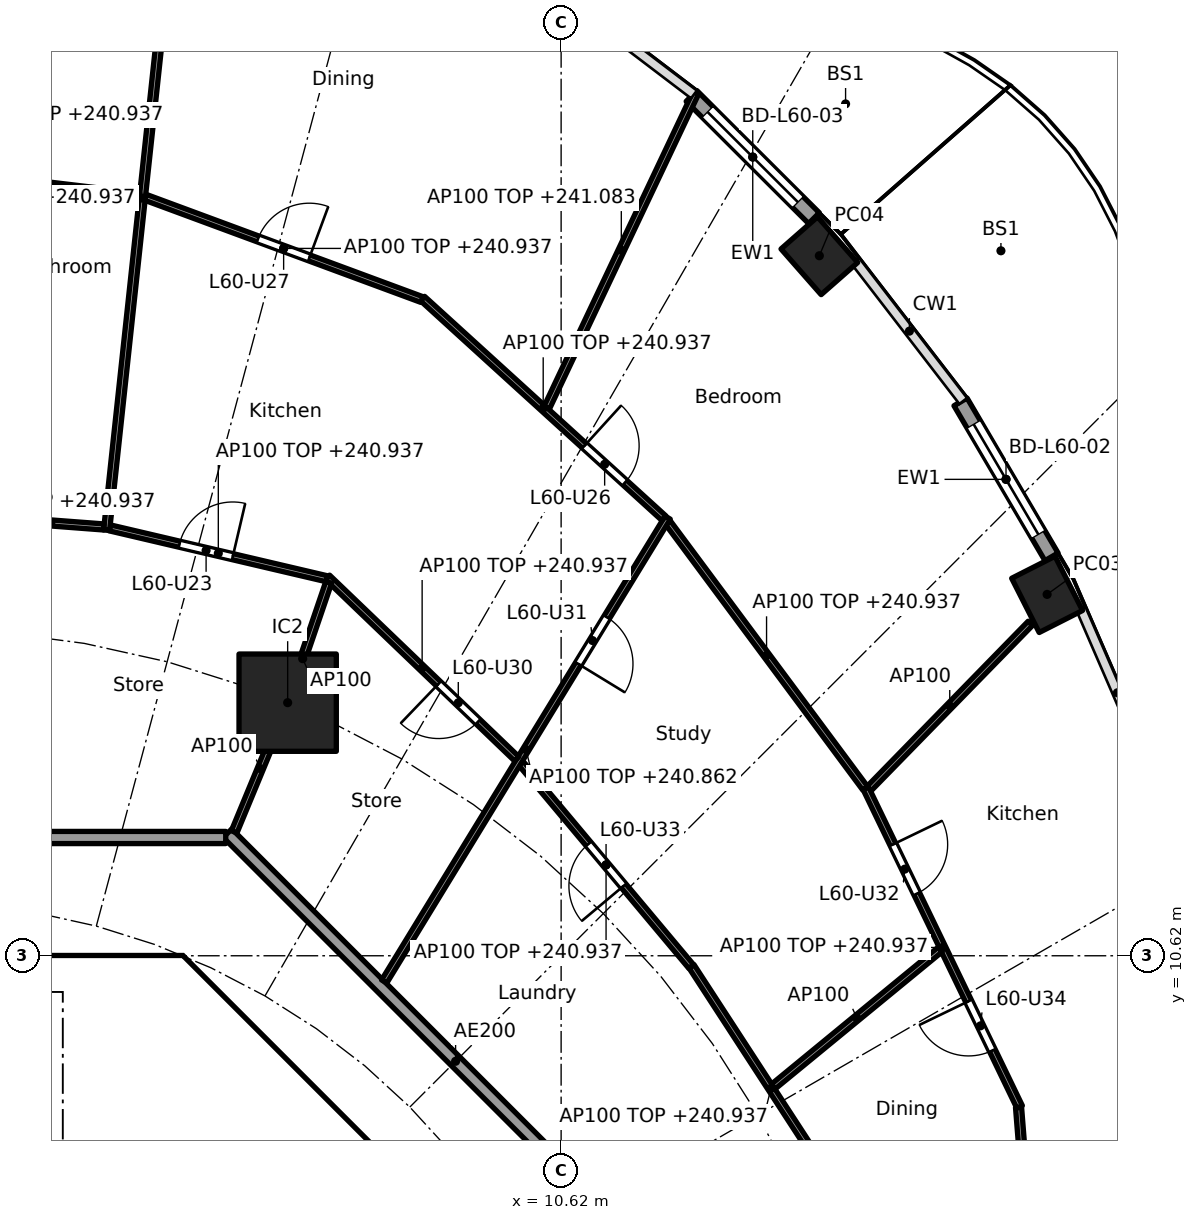
"""IFC4 building model, lengths in metres.
Left out: names, types, materials, properties, quantities, classifications, styles, units other than length and angle.
Written with IfcOpenShell. Run it as: python <this file> out.ifc"""

import sys

from ifc_helpers import new_model, si_unit, direction, frame, frame_2d, origin, origin_2d, place, context, subcontext, project, spatial, polyline, rectangle, hollow_rectangle, outline, extrude, element, fill, save


model = new_model("IFC4")
c1 = context("Model", 3, precision=1e-05, world=origin(), true_north=direction((0.0, 1.0)))
c2 = subcontext(c1, "Body", "Model", "MODEL_VIEW")
j1 = project(units=[si_unit("LENGTHUNIT", "METRE"), si_unit("PLANEANGLEUNIT", "RADIAN")], contexts=[c1])
p1 = place(None, origin())
s1 = spatial("IfcSite", under=j1, at=p1, CompositionType="ELEMENT")
p2 = place(p1, origin())
s2 = spatial("IfcBuilding", under=s1, at=p2, CompositionType="ELEMENT")
p3 = place(p2, frame((0.0, 0.0, 238.1)))
s3 = spatial("IfcBuildingStorey", under=s2, at=p3, CompositionType="ELEMENT", Elevation=238.1)
for number, where, z_axis, x_axis in (
    (1, (18.612, 16.563, 0.0), (0.0, 0.0, 1.0), (-0.452, 0.892, 0.0)),
    (2, (14.866, 22.132, 0.0), (0.0, 0.0, 1.0), (-0.66, 0.751, 0.0)),
):
    element("IfcColumn", number, at=place(p3, frame(where, z_axis=z_axis, x_axis=x_axis)), inside=s3, PredefinedType="COLUMN", context=c2, shape_type="SweptSolid", body=[
        extrude(hollow_rectangle(XDim=1.0, YDim=0.8, WallThickness=0.032, at=origin_2d()), origin(), (0.0, 0.0, 1.0), 3.7),
    ])
p4 = place(p3, frame((6.123, 14.782, 0.0), z_axis=(0.0, 0.0, 1.0), x_axis=(1.0, 0.0, 0.0)))
e3 = element("IfcColumn", 3, at=p4, inside=s3, PredefinedType="COLUMN", context=c2, shape_type="SweptSolid", body=[
    extrude(rectangle(XDim=1.6, YDim=1.6, at=origin_2d()), origin(), (0.0, 0.0, 1.0), 3.7),
])
p5 = place(p3, frame((17.188, 19.728, 0.0), z_axis=(0.0, 0.0, 1.0), x_axis=(0.506391620556, -0.862303616269, 0.0)))
e4 = element("IfcWall", 4, at=p5, inside=s3, PredefinedType="SOLIDWALL", context=c2, shape_type="SweptSolid", body=[
    extrude(rectangle(XDim=2.954, YDim=0.25, at=frame_2d((1.477, 0.0))), origin(), (0.0, 0.0, 1.0), 3.44),
])
p6 = place(p5, frame((0.427, 0.0, 0.0)))
e5 = element("IfcOpeningElement", 5, at=p6, cuts=e4, PredefinedType="OPENING", context=c2, shape_type="SweptSolid", body=[
    extrude(rectangle(XDim=2.1, YDim=2.4, at=frame_2d((1.05, 1.2))), frame((0.0, 0.135, 0.0), z_axis=(0.0, -1.0, 0.0), x_axis=(1.0, 0.0, 0.0)), (0.0, 0.0, 1.0), 0.27),
])
p7 = place(p3, frame((12.765, 24.759, 0.0), z_axis=(0.0, 0.0, 1.0), x_axis=(0.707793125551, -0.706419769983, 0.0)))
e6 = element("IfcWall", 6, at=p7, inside=s3, PredefinedType="SOLIDWALL", context=c2, shape_type="SweptSolid", body=[
    extrude(rectangle(XDim=2.844, YDim=0.25, at=frame_2d((1.422, 0.0))), origin(), (0.0, 0.0, 1.0), 3.44),
])
p8 = place(p7, frame((0.372, 0.0, 0.0)))
e7 = element("IfcOpeningElement", 7, at=p8, cuts=e6, PredefinedType="OPENING", context=c2, shape_type="SweptSolid", body=[
    extrude(rectangle(XDim=2.1, YDim=2.4, at=frame_2d((1.05, 1.2))), frame((0.0, 0.135, 0.0), z_axis=(0.0, -1.0, 0.0), x_axis=(1.0, 0.0, 0.0)), (0.0, 0.0, 1.0), 0.27),
])
p9 = place(p3, frame((9.988, 4.613, 0.0), z_axis=(0.0, 0.0, 1.0), x_axis=(-0.707106781187, 0.707106781187, 0.0)))
e8 = element("IfcWall", 8, at=p9, inside=s3, PredefinedType="SHEAR", context=c2, shape_type="SweptSolid", body=[
    extrude(rectangle(XDim=7.602, YDim=0.6, at=frame_2d((3.801, 0.0))), origin(), (0.0, 0.0, 1.0), 3.44),
])
p10 = place(p9, frame((3.201, 0.0, 0.0)))
e9 = element("IfcOpeningElement", 9, at=p10, cuts=e8, PredefinedType="OPENING", context=c2, shape_type="SweptSolid", body=[
    extrude(rectangle(XDim=1.2, YDim=2.1, at=frame_2d((0.6, 1.05))), frame((0.0, 0.31, 0.0), z_axis=(0.0, -1.0, 0.0), x_axis=(1.0, 0.0, 0.0)), (0.0, 0.0, 1.0), 0.62),
])
p11 = place(p3, frame((4.0, 7.025, 0.0), z_axis=(0.0, 0.0, 1.0), x_axis=(0.0, 1.0, 0.0)))
e10 = element("IfcWall", 10, at=p11, inside=s3, PredefinedType="SOLIDWALL", context=c2, shape_type="SweptSolid", body=[
    extrude(rectangle(XDim=3.0, YDim=0.2, at=frame_2d((1.5, 0.0))), origin(), (0.0, 0.0, 1.0), 3.44),
])
p12 = place(p11, frame((0.925, 0.0, 0.0)))
e11 = element("IfcOpeningElement", 11, at=p12, cuts=e10, PredefinedType="OPENING", context=c2, shape_type="SweptSolid", body=[
    extrude(rectangle(XDim=1.1, YDim=2.1, at=frame_2d((0.55, 1.05))), frame((0.0, 0.11, 0.0), z_axis=(0.0, -1.0, 0.0), x_axis=(1.0, 0.0, 0.0)), (0.0, 0.0, 1.0), 0.22),
])
p13 = place(p3, origin())
e12 = element("IfcWall", 12, at=p13, inside=s3, PredefinedType="SHEAR", context=c2, shape_type="SweptSolid", body=[
    extrude(outline(polyline([(-4.152, 10.025), (-4.401, 9.776), (-4.825, 10.2), (-4.401, 10.625), (4.401, 10.625), (4.825, 10.2), (4.401, 9.776), (4.152, 10.025), (-4.152, 10.025)])), origin(), (0.0, 0.0, 1.0), 3.44),
])
p14 = place(p3, frame((12.635, 5.134, 0.0), z_axis=(0.0, 0.0, 1.0), x_axis=(-0.707106781187, 0.707106781187, 0.0)))
e13 = element("IfcWall", 13, at=p14, inside=s3, PredefinedType="PARTITIONING", context=c2, shape_type="SweptSolid", body=[
    extrude(rectangle(XDim=10.609, YDim=0.2, at=frame_2d((5.305, 0.0))), origin(), (0.0, 0.0, 1.0), 3.44),
])
p15 = place(p3, frame((5.104, 12.565, 0.0), z_axis=(0.0, 0.0, 1.0), x_axis=(-1.0, 0.0, 0.0)))
e14 = element("IfcWall", 14, at=p15, inside=s3, PredefinedType="PARTITIONING", context=c2, shape_type="SweptSolid", body=[
    extrude(rectangle(XDim=10.409, YDim=0.2, at=frame_2d((5.205, 0.0))), origin(), (0.0, 0.0, 1.0), 3.44),
])
p16 = place(p15, frame((4.604, 0.0, 0.0)))
e15 = element("IfcOpeningElement", 15, at=p16, cuts=e14, PredefinedType="OPENING", context=c2, shape_type="SweptSolid", body=[
    extrude(rectangle(XDim=1.0, YDim=2.1, at=frame_2d((0.5, 1.05))), frame((0.0, 0.11, 0.0), z_axis=(0.0, -1.0, 0.0), x_axis=(1.0, 0.0, 0.0)), (0.0, 0.0, 1.0), 0.22),
])
p17 = place(p3, frame((18.578, 2.642, 0.0), z_axis=(0.0, 0.0, 1.0), x_axis=(-0.079179272956, 0.9968603928, 0.0)))
e16 = element("IfcWall", 16, at=p17, inside=s3, PredefinedType="PARTITIONING", context=c2, shape_type="SweptSolid", body=[
    extrude(rectangle(XDim=5.504, YDim=0.1, at=frame_2d((2.752, 0.0))), origin(), (0.0, 0.0, 1.0), 2.837),
])
p18 = place(p17, frame((0.926, 0.0, 0.0)))
e17 = element("IfcOpeningElement", 17, at=p18, cuts=e16, PredefinedType="OPENING", context=c2, shape_type="SweptSolid", body=[
    extrude(rectangle(XDim=0.9, YDim=2.1, at=frame_2d((0.45, 1.05))), frame((0.0, 0.06, 0.0), z_axis=(0.0, -1.0, 0.0), x_axis=(1.0, 0.0, 0.0)), (0.0, 0.0, 1.0), 0.12),
])
p19 = place(p3, frame((15.377, 6.429, 0.0), z_axis=(0.0, 0.0, 1.0), x_axis=(-0.545188882757, 0.838313236278, 0.0)))
e18 = element("IfcWall", 18, at=p19, inside=s3, PredefinedType="PARTITIONING", context=c2, shape_type="SweptSolid", body=[
    extrude(rectangle(XDim=4.792, YDim=0.1, at=frame_2d((2.396, 0.0))), origin(), (0.0, 0.0, 1.0), 2.837),
])
p20 = place(p3, frame((18.16, 8.134, 0.0), z_axis=(0.0, 0.0, 1.0), x_axis=(-0.434644733493, 0.900601996248, 0.0)))
e19 = element("IfcWall", 19, at=p20, inside=s3, PredefinedType="PARTITIONING", context=c2, shape_type="SweptSolid", body=[
    extrude(rectangle(XDim=5.824, YDim=0.1, at=frame_2d((2.912, 0.0))), origin(), (0.0, 0.0, 1.0), 2.837),
])
p21 = place(p20, frame((3.893, 0.0, 0.0)))
e20 = element("IfcOpeningElement", 20, at=p21, cuts=e19, PredefinedType="OPENING", context=c2, shape_type="SweptSolid", body=[
    extrude(rectangle(XDim=0.9, YDim=2.1, at=frame_2d((0.45, 1.05))), frame((0.0, 0.06, 0.0), z_axis=(0.0, -1.0, 0.0), x_axis=(1.0, 0.0, 0.0)), (0.0, 0.0, 1.0), 0.12),
])
p22 = place(p20, frame((1.031, 0.0, 0.0)))
e21 = element("IfcOpeningElement", 21, at=p22, cuts=e19, PredefinedType="OPENING", context=c2, shape_type="SweptSolid", body=[
    extrude(rectangle(XDim=0.9, YDim=2.1, at=frame_2d((0.45, 1.05))), frame((0.0, 0.06, 0.0), z_axis=(0.0, -1.0, 0.0), x_axis=(1.0, 0.0, 0.0)), (0.0, 0.0, 1.0), 0.12),
])
p23 = place(p3, frame((14.109, 8.469, 0.0), z_axis=(0.0, 0.0, 1.0), x_axis=(0.772802064515, 0.634647121699, 0.0)))
e22 = element("IfcWall", 22, at=p23, inside=s3, PredefinedType="PARTITIONING", context=c2, shape_type="SweptSolid", body=[
    extrude(rectangle(XDim=3.554, YDim=0.1, at=frame_2d((1.777, 0.0))), origin(), (0.0, 0.0, 1.0), 3.44),
])
p24 = place(p3, frame((12.759, 10.443, 0.0), z_axis=(0.0, 0.0, 1.0), x_axis=(-0.642225196965, 0.766516011825, 0.0)))
e23 = element("IfcWall", 23, at=p24, inside=s3, PredefinedType="PARTITIONING", context=c2, shape_type="SweptSolid", body=[
    extrude(rectangle(XDim=4.361, YDim=0.1, at=frame_2d((2.18, 0.0))), origin(), (0.0, 0.0, 1.0), 2.837),
])
p25 = place(p24, frame((1.73, 0.0, 0.0)))
e24 = element("IfcOpeningElement", 24, at=p25, cuts=e23, PredefinedType="OPENING", context=c2, shape_type="SweptSolid", body=[
    extrude(rectangle(XDim=0.9, YDim=2.1, at=frame_2d((0.45, 1.05))), frame((0.0, 0.06, 0.0), z_axis=(0.0, -1.0, 0.0), x_axis=(1.0, 0.0, 0.0)), (0.0, 0.0, 1.0), 0.12),
])
p26 = place(p3, frame((15.685, 13.37, 0.0), z_axis=(0.0, 0.0, 1.0), x_axis=(0.698404210398, 0.715703541208, 0.0)))
e25 = element("IfcWall", 25, at=p26, inside=s3, PredefinedType="PARTITIONING", context=c2, shape_type="SweptSolid", body=[
    extrude(rectangle(XDim=3.796, YDim=0.1, at=frame_2d((1.898, 0.0))), origin(), (0.0, 0.0, 1.0), 3.44),
])
p27 = place(p3, frame((15.621, 13.374, 0.0), z_axis=(0.0, 0.0, 1.0), x_axis=(-0.596174489482, 0.8028548923, 0.0)))
e26 = element("IfcWall", 26, at=p27, inside=s3, PredefinedType="PARTITIONING", context=c2, shape_type="SweptSolid", body=[
    extrude(rectangle(XDim=5.442, YDim=0.1, at=frame_2d((2.721, 0.0))), origin(), (0.0, 0.0, 1.0), 2.837),
])
p28 = place(p3, frame((7.71, 10.197, 0.0), z_axis=(0.0, 0.0, 1.0), x_axis=(0.521477621335, 0.853264959111, 0.0)))
e27 = element("IfcWall", 27, at=p28, inside=s3, PredefinedType="PARTITIONING", context=c2, shape_type="SweptSolid", body=[
    extrude(rectangle(XDim=8.941, YDim=0.1, at=frame_2d((4.471, 0.0))), origin(), (0.0, 0.0, 1.0), 2.762),
])
p29 = place(p28, frame((6.121, 0.0, 0.0)))
e28 = element("IfcOpeningElement", 28, at=p29, cuts=e27, PredefinedType="OPENING", context=c2, shape_type="SweptSolid", body=[
    extrude(rectangle(XDim=0.9, YDim=2.1, at=frame_2d((0.45, 1.05))), frame((0.0, 0.06, 0.0), z_axis=(0.0, -1.0, 0.0), x_axis=(1.0, 0.0, 0.0)), (0.0, 0.0, 1.0), 0.12),
])
p30 = place(p3, frame((9.89, 13.858, 0.0), z_axis=(0.0, 0.0, 1.0), x_axis=(-0.72167233993, 0.692234811159, 0.0)))
e29 = element("IfcWall", 29, at=p30, inside=s3, PredefinedType="PARTITIONING", context=c2, shape_type="SweptSolid", body=[
    extrude(rectangle(XDim=4.313, YDim=0.1, at=frame_2d((2.156, 0.0))), origin(), (0.0, 0.0, 1.0), 2.837),
])
p31 = place(p30, frame((0.883, 0.0, 0.0)))
e30 = element("IfcOpeningElement", 30, at=p31, cuts=e29, PredefinedType="OPENING", context=c2, shape_type="SweptSolid", body=[
    extrude(rectangle(XDim=0.9, YDim=2.1, at=frame_2d((0.45, 1.05))), frame((0.0, 0.06, 0.0), z_axis=(0.0, -1.0, 0.0), x_axis=(1.0, 0.0, 0.0)), (0.0, 0.0, 1.0), 0.12),
])
p32 = place(p3, frame((12.31, 17.817, 0.0), z_axis=(0.0, 0.0, 1.0), x_axis=(-0.739697052892, 0.672940019573, 0.0)))
e31 = element("IfcWall", 31, at=p32, inside=s3, PredefinedType="PARTITIONING", context=c2, shape_type="SweptSolid", body=[
    extrude(rectangle(XDim=5.365, YDim=0.1, at=frame_2d((2.683, 0.0))), origin(), (0.0, 0.0, 1.0), 2.837),
])
p33 = place(p32, frame((0.866, 0.0, 0.0)))
e32 = element("IfcOpeningElement", 32, at=p33, cuts=e31, PredefinedType="OPENING", context=c2, shape_type="SweptSolid", body=[
    extrude(rectangle(XDim=0.9, YDim=2.1, at=frame_2d((0.45, 1.05))), frame((0.0, 0.06, 0.0), z_axis=(0.0, -1.0, 0.0), x_axis=(1.0, 0.0, 0.0)), (0.0, 0.0, 1.0), 0.12),
])
p34 = place(p3, frame((10.384, 19.634, 0.0), z_axis=(0.0, 0.0, 1.0), x_axis=(0.428003913038, 0.903776880886, 0.0)))
e33 = element("IfcWall", 33, at=p34, inside=s3, PredefinedType="PARTITIONING", context=c2, shape_type="SweptSolid", body=[
    extrude(rectangle(XDim=5.729, YDim=0.1, at=frame_2d((2.865, 0.0))), origin(), (0.0, 0.0, 1.0), 2.983),
])
p35 = place(p3, frame((5.243, 12.657, 0.0), z_axis=(0.0, 0.0, 1.0), x_axis=(0.382719158442, 0.923864733477, 0.0)))
e34 = element("IfcWall", 34, at=p35, inside=s3, PredefinedType="PARTITIONING", context=c2, shape_type="SweptSolid", body=[
    extrude(rectangle(XDim=2.25, YDim=0.1, at=frame_2d((1.125, 0.0))), origin(), (0.0, 0.0, 1.0), 3.44),
])
p36 = place(p3, frame((6.139, 14.829, 0.0), z_axis=(0.0, 0.0, 1.0), x_axis=(0.32278593828, 0.946471995385, 0.0)))
e35 = element("IfcWall", 35, at=p36, inside=s3, PredefinedType="PARTITIONING", context=c2, shape_type="SweptSolid", body=[
    extrude(rectangle(XDim=2.042, YDim=0.1, at=frame_2d((1.021, 0.0))), origin(), (0.0, 0.0, 1.0), 3.44),
])
p37 = place(p3, frame((6.766, 16.82, 0.0), z_axis=(0.0, 0.0, 1.0), x_axis=(-0.973612608559, 0.22820711745, 0.0)))
e36 = element("IfcWall", 36, at=p37, inside=s3, PredefinedType="PARTITIONING", context=c2, shape_type="SweptSolid", body=[
    extrude(rectangle(XDim=3.663, YDim=0.1, at=frame_2d((1.832, 0.0))), origin(), (0.0, 0.0, 1.0), 2.837),
])
p38 = place(p37, frame((1.588, 0.0, 0.0)))
e37 = element("IfcOpeningElement", 37, at=p38, cuts=e36, PredefinedType="OPENING", context=c2, shape_type="SweptSolid", body=[
    extrude(rectangle(XDim=0.9, YDim=2.1, at=frame_2d((0.45, 1.05))), frame((0.0, 0.06, 0.0), z_axis=(0.0, -1.0, 0.0), x_axis=(1.0, 0.0, 0.0)), (0.0, 0.0, 1.0), 0.12),
])
p39 = place(p3, frame((8.331, 21.411, 0.0), z_axis=(0.0, 0.0, 1.0), x_axis=(-0.937891982431, 0.346927412136, 0.0)))
e38 = element("IfcWall", 38, at=p39, inside=s3, PredefinedType="PARTITIONING", context=c2, shape_type="SweptSolid", body=[
    extrude(rectangle(XDim=4.85, YDim=0.1, at=frame_2d((2.425, 0.0))), origin(), (0.0, 0.0, 1.0), 2.837),
])
p40 = place(p39, frame((1.975, 0.0, 0.0)))
e39 = element("IfcOpeningElement", 39, at=p40, cuts=e38, PredefinedType="OPENING", context=c2, shape_type="SweptSolid", body=[
    extrude(rectangle(XDim=0.9, YDim=2.1, at=frame_2d((0.45, 1.05))), frame((0.0, 0.06, 0.0), z_axis=(0.0, -1.0, 0.0), x_axis=(1.0, 0.0, 0.0)), (0.0, 0.0, 1.0), 0.12),
])
p41 = place(p3, frame((3.145, 17.618, 0.0), z_axis=(0.0, 0.0, 1.0), x_axis=(0.106818720076, 0.994278512813, 0.0)))
e40 = element("IfcWall", 40, at=p41, inside=s3, PredefinedType="PARTITIONING", context=c2, shape_type="SweptSolid", body=[
    extrude(rectangle(XDim=10.987, YDim=0.1, at=frame_2d((5.493, 0.0))), origin(), (0.0, 0.0, 1.0), 2.837),
])
p42 = place(p3, frame((3.101, 17.671, 0.0), z_axis=(0.0, 0.0, 1.0), x_axis=(-0.997127864669, 0.075736526859, 0.0)))
e41 = element("IfcWall", 41, at=p42, inside=s3, PredefinedType="PARTITIONING", context=c2, shape_type="SweptSolid", body=[
    extrude(rectangle(XDim=1.75, YDim=0.1, at=frame_2d((0.875, 0.0))), origin(), (0.0, 0.0, 1.0), 2.837),
])
p43 = place(p3, frame((3.686, 23.117, 0.0), z_axis=(0.0, 0.0, 1.0), x_axis=(-0.992965872314, 0.11840091393, 0.0)))
e42 = element("IfcWall", 42, at=p43, inside=s3, PredefinedType="PARTITIONING", context=c2, shape_type="SweptSolid", body=[
    extrude(rectangle(XDim=4.786, YDim=0.1, at=frame_2d((2.393, 0.0))), origin(), (0.0, 0.0, 1.0), 2.837),
])
p44 = place(p6, origin())
e43 = element("IfcDoor", 43, at=p44, inside=s3, OperationType="SLIDING_TO_LEFT", PredefinedType="DOOR", context=c2, shape_type="SweptSolid", body=[
    extrude(rectangle(XDim=2.1, YDim=2.4, at=frame_2d((1.05, 1.2))), frame((0.0, 0.025, 0.0), z_axis=(0.0, -1.0, 0.0), x_axis=(1.0, 0.0, 0.0)), (0.0, 0.0, 1.0), 0.05),
])
fill(e5, e43)
p45 = place(p8, origin())
e44 = element("IfcDoor", 44, at=p45, inside=s3, OperationType="SLIDING_TO_LEFT", PredefinedType="DOOR", context=c2, shape_type="SweptSolid", body=[
    extrude(rectangle(XDim=2.1, YDim=2.4, at=frame_2d((1.05, 1.2))), frame((0.0, 0.025, 0.0), z_axis=(0.0, -1.0, 0.0), x_axis=(1.0, 0.0, 0.0)), (0.0, 0.0, 1.0), 0.05),
])
fill(e7, e44)
p46 = place(p12, origin())
e45 = element("IfcDoor", 45, at=p46, inside=s3, OperationType="SINGLE_SWING_LEFT", PredefinedType="DOOR", context=c2, shape_type="SweptSolid", body=[
    extrude(rectangle(XDim=1.1, YDim=2.1, at=frame_2d((0.55, 1.05))), frame((0.0, 0.025, 0.0), z_axis=(0.0, -1.0, 0.0), x_axis=(1.0, 0.0, 0.0)), (0.0, 0.0, 1.0), 0.05),
])
fill(e11, e45)
p47 = place(p10, origin())
e46 = element("IfcDoor", 46, at=p47, inside=s3, OperationType="SINGLE_SWING_LEFT", PredefinedType="DOOR", context=c2, shape_type="SweptSolid", body=[
    extrude(rectangle(XDim=1.2, YDim=2.1, at=frame_2d((0.6, 1.05))), frame((0.0, 0.025, 0.0), z_axis=(0.0, -1.0, 0.0), x_axis=(1.0, 0.0, 0.0)), (0.0, 0.0, 1.0), 0.05),
])
fill(e9, e46)
p48 = place(p38, frame((0.9, 0.0, 0.0), x_axis=(-1.0, 0.0, 0.0)))
e47 = element("IfcDoor", 47, at=p48, inside=s3, OperationType="SINGLE_SWING_RIGHT", PredefinedType="DOOR", context=c2, shape_type="SweptSolid", body=[
    extrude(rectangle(XDim=0.9, YDim=2.1, at=frame_2d((0.45, 1.05))), frame((0.0, 0.025, 0.0), z_axis=(0.0, -1.0, 0.0), x_axis=(1.0, 0.0, 0.0)), (0.0, 0.0, 1.0), 0.05),
])
fill(e37, e47)
p49 = place(p33, frame((0.9, 0.0, 0.0), x_axis=(-1.0, 0.0, 0.0)))
e48 = element("IfcDoor", 48, at=p49, inside=s3, OperationType="SINGLE_SWING_LEFT", PredefinedType="DOOR", context=c2, shape_type="SweptSolid", body=[
    extrude(rectangle(XDim=0.9, YDim=2.1, at=frame_2d((0.45, 1.05))), frame((0.0, 0.025, 0.0), z_axis=(0.0, -1.0, 0.0), x_axis=(1.0, 0.0, 0.0)), (0.0, 0.0, 1.0), 0.05),
])
fill(e32, e48)
p50 = place(p40, frame((0.9, 0.0, 0.0), x_axis=(-1.0, 0.0, 0.0)))
e49 = element("IfcDoor", 49, at=p50, inside=s3, OperationType="SINGLE_SWING_RIGHT", PredefinedType="DOOR", context=c2, shape_type="SweptSolid", body=[
    extrude(rectangle(XDim=0.9, YDim=2.1, at=frame_2d((0.45, 1.05))), frame((0.0, 0.025, 0.0), z_axis=(0.0, -1.0, 0.0), x_axis=(1.0, 0.0, 0.0)), (0.0, 0.0, 1.0), 0.05),
])
fill(e39, e49)
p51 = place(p31, origin())
e50 = element("IfcDoor", 50, at=p51, inside=s3, OperationType="SINGLE_SWING_RIGHT", PredefinedType="DOOR", context=c2, shape_type="SweptSolid", body=[
    extrude(rectangle(XDim=0.9, YDim=2.1, at=frame_2d((0.45, 1.05))), frame((0.0, 0.025, 0.0), z_axis=(0.0, -1.0, 0.0), x_axis=(1.0, 0.0, 0.0)), (0.0, 0.0, 1.0), 0.05),
])
fill(e30, e50)
p52 = place(p29, frame((0.9, 0.0, 0.0), x_axis=(-1.0, 0.0, 0.0)))
e51 = element("IfcDoor", 51, at=p52, inside=s3, OperationType="SINGLE_SWING_RIGHT", PredefinedType="DOOR", context=c2, shape_type="SweptSolid", body=[
    extrude(rectangle(XDim=0.9, YDim=2.1, at=frame_2d((0.45, 1.05))), frame((0.0, 0.025, 0.0), z_axis=(0.0, -1.0, 0.0), x_axis=(1.0, 0.0, 0.0)), (0.0, 0.0, 1.0), 0.05),
])
fill(e28, e51)
p53 = place(p21, frame((0.9, 0.0, 0.0), x_axis=(-1.0, 0.0, 0.0)))
e52 = element("IfcDoor", 52, at=p53, inside=s3, OperationType="SINGLE_SWING_LEFT", PredefinedType="DOOR", context=c2, shape_type="SweptSolid", body=[
    extrude(rectangle(XDim=0.9, YDim=2.1, at=frame_2d((0.45, 1.05))), frame((0.0, 0.025, 0.0), z_axis=(0.0, -1.0, 0.0), x_axis=(1.0, 0.0, 0.0)), (0.0, 0.0, 1.0), 0.05),
])
fill(e20, e52)
p54 = place(p25, origin())
e53 = element("IfcDoor", 53, at=p54, inside=s3, OperationType="SINGLE_SWING_LEFT", PredefinedType="DOOR", context=c2, shape_type="SweptSolid", body=[
    extrude(rectangle(XDim=0.9, YDim=2.1, at=frame_2d((0.45, 1.05))), frame((0.0, 0.025, 0.0), z_axis=(0.0, -1.0, 0.0), x_axis=(1.0, 0.0, 0.0)), (0.0, 0.0, 1.0), 0.05),
])
fill(e24, e53)
p55 = place(p22, origin())
e54 = element("IfcDoor", 54, at=p55, inside=s3, OperationType="SINGLE_SWING_RIGHT", PredefinedType="DOOR", context=c2, shape_type="SweptSolid", body=[
    extrude(rectangle(XDim=0.9, YDim=2.1, at=frame_2d((0.45, 1.05))), frame((0.0, 0.025, 0.0), z_axis=(0.0, -1.0, 0.0), x_axis=(1.0, 0.0, 0.0)), (0.0, 0.0, 1.0), 0.05),
])
fill(e21, e54)
save(model, sys.argv[1])
